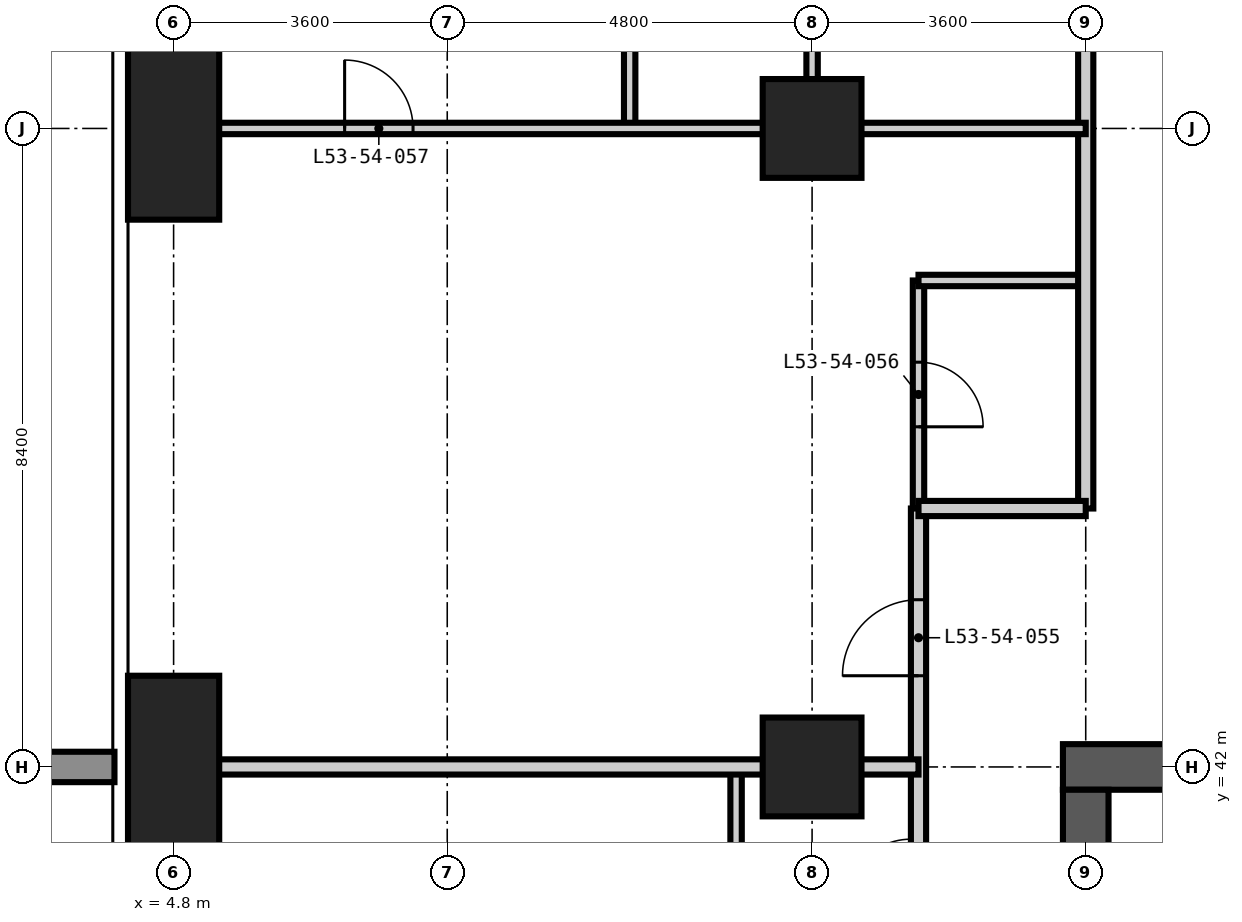
"""IFC4 building model, lengths in metres.
Left out: names, types, materials, properties, quantities, classifications, styles, units other than length and angle.
Written with IfcOpenShell. Run it as: python <this file> out.ifc"""

import sys

from ifc_helpers import new_model, si_unit, direction, frame, frame_2d, origin, origin_2d, place, context, subcontext, project, spatial, rectangle, extrude, element, fill, save


model = new_model("IFC4")
c1 = context("Model", 3, precision=1e-05, world=origin(), true_north=direction((0.0, 1.0)))
c2 = subcontext(c1, "Body", "Model", "MODEL_VIEW")
j1 = project(units=[si_unit("LENGTHUNIT", "METRE"), si_unit("PLANEANGLEUNIT", "RADIAN")], contexts=[c1])
p1 = place(None, origin())
s1 = spatial("IfcSite", under=j1, at=p1, CompositionType="ELEMENT")
p2 = place(p1, origin())
s2 = spatial("IfcBuilding", under=s1, at=p2, CompositionType="ELEMENT")
p3 = place(p2, frame((0.0, 0.0, 205.8)))
s3 = spatial("IfcBuildingStorey", under=s2, at=p3, CompositionType="ELEMENT", Elevation=205.8)
for number, where, z_axis, x_axis in (
    (1, (4.8, 42.0, -0.35), (0.0, 0.0, 1.0), (1.0, 0.0, 0.0)),
    (2, (4.8, 50.4, -0.35), (0.0, 0.0, 1.0), (1.0, 0.0, 0.0)),
):
    element("IfcColumn", number, at=place(p3, frame(where, z_axis=z_axis, x_axis=x_axis)), inside=s3, PredefinedType="COLUMN", context=c2, shape_type="SweptSolid", body=[
        extrude(rectangle(XDim=1.2, YDim=2.4, at=origin_2d()), origin(), (0.0, 0.0, 1.0), 3.6),
    ])
for number, where, z_axis, x_axis in (
    (3, (13.2, 42.0, -0.35), (0.0, 0.0, 1.0), (1.0, 0.0, 0.0)),
    (4, (13.2, 50.4, -0.35), (0.0, 0.0, 1.0), (1.0, 0.0, 0.0)),
):
    element("IfcColumn", number, at=place(p3, frame(where, z_axis=z_axis, x_axis=x_axis)), inside=s3, PredefinedType="COLUMN", context=c2, shape_type="SweptSolid", body=[
        extrude(rectangle(XDim=1.3, YDim=1.3, at=origin_2d()), origin(), (0.0, 0.0, 1.0), 3.6),
    ])
p4 = place(p3, frame((42.3, 42.0, -0.35), z_axis=(0.0, 0.0, 1.0), x_axis=(-1.0, 0.0, 0.0)))
e5 = element("IfcWall", 5, at=p4, inside=s3, PredefinedType="SHEAR", context=c2, shape_type="SweptSolid", body=[
    extrude(rectangle(XDim=25.8, YDim=0.6, at=frame_2d((12.9, 0.0))), origin(), (0.0, 0.0, 1.0), 3.6),
])
p5 = place(p4, frame((20.8, 0.0, 0.35)))
e6 = element("IfcOpeningElement", 6, at=p5, cuts=e5, PredefinedType="OPENING", context=c2, shape_type="SweptSolid", body=[
    extrude(rectangle(XDim=1.0, YDim=2.1, at=frame_2d((0.5, 1.05))), frame((0.0, 0.31, 0.0), z_axis=(0.0, -1.0, 0.0), x_axis=(1.0, 0.0, 0.0)), (0.0, 0.0, 1.0), 0.62),
])
p6 = place(p4, frame((10.2, 0.0, 0.35)))
e7 = element("IfcOpeningElement", 7, at=p6, cuts=e5, PredefinedType="OPENING", context=c2, shape_type="SweptSolid", body=[
    extrude(rectangle(XDim=1.2, YDim=2.2, at=frame_2d((0.6, 1.1))), frame((0.0, 0.31, 0.0), z_axis=(0.0, -1.0, 0.0), x_axis=(1.0, 0.0, 0.0)), (0.0, 0.0, 1.0), 0.62),
])
p7 = place(p3, frame((16.8, 41.7, -0.35), z_axis=(0.0, 0.0, 1.0), x_axis=(0.0, -1.0, 0.0)))
e8 = element("IfcWall", 8, at=p7, inside=s3, PredefinedType="SHEAR", context=c2, shape_type="SweptSolid", body=[
    extrude(rectangle(XDim=24.6, YDim=0.6, at=frame_2d((12.3, 0.0))), origin(), (0.0, 0.0, 1.0), 3.6),
])
p8 = place(p7, frame((11.4, 0.0, 0.35)))
e9 = element("IfcOpeningElement", 9, at=p8, cuts=e8, PredefinedType="OPENING", context=c2, shape_type="SweptSolid", body=[
    extrude(rectangle(XDim=1.8, YDim=2.2, at=frame_2d((0.9, 1.1))), frame((0.0, 0.31, 0.0), z_axis=(0.0, -1.0, 0.0), x_axis=(1.0, 0.0, 0.0)), (0.0, 0.0, 1.0), 0.62),
])
p9 = place(p7, frame((20.2, 0.0, 0.35)))
e10 = element("IfcOpeningElement", 10, at=p9, cuts=e8, PredefinedType="OPENING", context=c2, shape_type="SweptSolid", body=[
    extrude(rectangle(XDim=1.0, YDim=2.1, at=frame_2d((0.5, 1.05))), frame((0.0, 0.31, 0.0), z_axis=(0.0, -1.0, 0.0), x_axis=(1.0, 0.0, 0.0)), (0.0, 0.0, 1.0), 0.62),
])
p10 = place(p7, frame((5.5, 0.0, 0.35)))
e11 = element("IfcOpeningElement", 11, at=p10, cuts=e8, PredefinedType="OPENING", context=c2, shape_type="SweptSolid", body=[
    extrude(rectangle(XDim=1.0, YDim=2.1, at=frame_2d((0.5, 1.05))), frame((0.0, 0.31, 0.0), z_axis=(0.0, -1.0, 0.0), x_axis=(1.0, 0.0, 0.0)), (0.0, 0.0, 1.0), 0.62),
])
p11 = place(p3, frame((12.2, 40.2, 0.0), z_axis=(0.0, 0.0, 1.0), x_axis=(0.0, 1.0, 0.0)))
e12 = element("IfcWall", 12, at=p11, inside=s3, PredefinedType="PARTITIONING", context=c2, shape_type="SweptSolid", body=[
    extrude(rectangle(XDim=1.8, YDim=0.15, at=frame_2d((0.9, 0.0))), origin(), (0.0, 0.0, 1.0), 3.25),
])
p12 = place(p3, frame((14.6, 45.4, 0.0), z_axis=(0.0, 0.0, 1.0), x_axis=(0.0, 1.0, 0.0)))
e13 = element("IfcWall", 13, at=p12, inside=s3, PredefinedType="PARTITIONING", context=c2, shape_type="SweptSolid", body=[
    extrude(rectangle(XDim=3.0, YDim=0.15, at=frame_2d((1.5, 0.0))), origin(), (0.0, 0.0, 1.0), 3.25),
])
p13 = place(p12, frame((1.075, 0.0, 0.0)))
e14 = element("IfcOpeningElement", 14, at=p13, cuts=e13, PredefinedType="OPENING", context=c2, shape_type="SweptSolid", body=[
    extrude(rectangle(XDim=0.85, YDim=2.1, at=frame_2d((0.425, 1.05))), frame((0.0, 0.085, 0.0), z_axis=(0.0, -1.0, 0.0), x_axis=(1.0, 0.0, 0.0)), (0.0, 0.0, 1.0), 0.17),
])
p14 = place(p3, frame((14.6, 48.4, 0.0), z_axis=(0.0, 0.0, 1.0), x_axis=(1.0, 0.0, 0.0)))
e15 = element("IfcWall", 15, at=p14, inside=s3, PredefinedType="PARTITIONING", context=c2, shape_type="SweptSolid", body=[
    extrude(rectangle(XDim=2.2, YDim=0.15, at=frame_2d((1.1, 0.0))), origin(), (0.0, 0.0, 1.0), 3.25),
])
p15 = place(p3, frame((14.6, 29.4, 0.0), z_axis=(0.0, 0.0, 1.0), x_axis=(0.0, 1.0, 0.0)))
e16 = element("IfcWall", 16, at=p15, inside=s3, PredefinedType="PARTITIONING", context=c2, shape_type="SweptSolid", body=[
    extrude(rectangle(XDim=16.0, YDim=0.2, at=frame_2d((8.0, 0.0))), origin(), (0.0, 0.0, 1.0), 3.25),
])
p16 = place(p15, frame((9.1, 0.0, 0.0)))
e17 = element("IfcOpeningElement", 17, at=p16, cuts=e16, PredefinedType="OPENING", context=c2, shape_type="SweptSolid", body=[
    extrude(rectangle(XDim=1.0, YDim=2.2, at=frame_2d((0.5, 1.1))), frame((0.0, 0.11, 0.0), z_axis=(0.0, -1.0, 0.0), x_axis=(1.0, 0.0, 0.0)), (0.0, 0.0, 1.0), 0.22),
])
p17 = place(p15, frame((13.8, 0.0, 0.0)))
e18 = element("IfcOpeningElement", 18, at=p17, cuts=e16, PredefinedType="OPENING", context=c2, shape_type="SweptSolid", body=[
    extrude(rectangle(XDim=1.0, YDim=2.2, at=frame_2d((0.5, 1.1))), frame((0.0, 0.11, 0.0), z_axis=(0.0, -1.0, 0.0), x_axis=(1.0, 0.0, 0.0)), (0.0, 0.0, 1.0), 0.22),
])
p18 = place(p3, frame((16.8, 45.4, 0.0), z_axis=(0.0, 0.0, 1.0), x_axis=(0.0, 1.0, 0.0)))
e19 = element("IfcWall", 19, at=p18, inside=s3, PredefinedType="PARTITIONING", context=c2, shape_type="SweptSolid", body=[
    extrude(rectangle(XDim=9.218, YDim=0.2, at=frame_2d((4.609, 0.0))), origin(), (0.0, 0.0, 1.0), 3.25),
])
p19 = place(p3, frame((14.6, 45.4, 0.0), z_axis=(0.0, 0.0, 1.0), x_axis=(1.0, 0.0, 0.0)))
e20 = element("IfcWall", 20, at=p19, inside=s3, PredefinedType="PARTITIONING", context=c2, shape_type="SweptSolid", body=[
    extrude(rectangle(XDim=2.2, YDim=0.2, at=frame_2d((1.1, 0.0))), origin(), (0.0, 0.0, 1.0), 3.25),
])
p20 = place(p3, frame((4.182, 42.0, 0.0), z_axis=(0.0, 0.0, 1.0), x_axis=(1.0, 0.0, 0.0)))
e21 = element("IfcWall", 21, at=p20, inside=s3, PredefinedType="PARTITIONING", context=c2, shape_type="SweptSolid", body=[
    extrude(rectangle(XDim=10.418, YDim=0.2, at=frame_2d((5.209, 0.0))), origin(), (0.0, 0.0, 1.0), 3.25),
])
p21 = place(p3, frame((10.8, 50.4, 0.0), z_axis=(0.0, 0.0, 1.0), x_axis=(0.0, 1.0, 0.0)))
e22 = element("IfcWall", 22, at=p21, inside=s3, PredefinedType="PARTITIONING", context=c2, shape_type="SweptSolid", body=[
    extrude(rectangle(XDim=3.0, YDim=0.15, at=frame_2d((1.5, 0.0))), origin(), (0.0, 0.0, 1.0), 3.25),
])
p22 = place(p21, frame((1.05, 0.0, 0.0)))
e23 = element("IfcOpeningElement", 23, at=p22, cuts=e22, PredefinedType="OPENING", context=c2, shape_type="SweptSolid", body=[
    extrude(rectangle(XDim=0.9, YDim=2.1, at=frame_2d((0.45, 1.05))), frame((0.0, 0.085, 0.0), z_axis=(0.0, -1.0, 0.0), x_axis=(1.0, 0.0, 0.0)), (0.0, 0.0, 1.0), 0.17),
])
p23 = place(p3, frame((13.2, 50.4, 0.0), z_axis=(0.0, 0.0, 1.0), x_axis=(0.0, 1.0, 0.0)))
e24 = element("IfcWall", 24, at=p23, inside=s3, PredefinedType="PARTITIONING", context=c2, shape_type="SweptSolid", body=[
    extrude(rectangle(XDim=3.0, YDim=0.15, at=frame_2d((1.5, 0.0))), origin(), (0.0, 0.0, 1.0), 3.25),
])
p24 = place(p3, frame((4.182, 50.4, 0.0), z_axis=(0.0, 0.0, 1.0), x_axis=(1.0, 0.0, 0.0)))
e25 = element("IfcWall", 25, at=p24, inside=s3, PredefinedType="PARTITIONING", context=c2, shape_type="SweptSolid", body=[
    extrude(rectangle(XDim=12.618, YDim=0.15, at=frame_2d((6.309, 0.0))), origin(), (0.0, 0.0, 1.0), 3.25),
])
p25 = place(p24, frame((2.868, 0.0, 0.0)))
e26 = element("IfcOpeningElement", 26, at=p25, cuts=e25, PredefinedType="OPENING", context=c2, shape_type="SweptSolid", body=[
    extrude(rectangle(XDim=0.9, YDim=2.1, at=frame_2d((0.45, 1.05))), frame((0.0, 0.085, 0.0), z_axis=(0.0, -1.0, 0.0), x_axis=(1.0, 0.0, 0.0)), (0.0, 0.0, 1.0), 0.17),
])
p26 = place(p17, origin())
e27 = element("IfcDoor", 27, at=p26, inside=s3, OperationType="SINGLE_SWING_LEFT", PredefinedType="DOOR", context=c2, shape_type="SweptSolid", body=[
    extrude(rectangle(XDim=1.0, YDim=2.2, at=frame_2d((0.5, 1.1))), frame((0.0, 0.025, 0.0), z_axis=(0.0, -1.0, 0.0), x_axis=(1.0, 0.0, 0.0)), (0.0, 0.0, 1.0), 0.05),
])
fill(e18, e27)
p27 = place(p13, frame((0.85, 0.0, 0.0), z_axis=(0.0, 0.0, 1.0), x_axis=(-1.0, 0.0, 0.0)))
e28 = element("IfcDoor", 28, at=p27, inside=s3, OperationType="SINGLE_SWING_RIGHT", PredefinedType="DOOR", context=c2, shape_type="SweptSolid", body=[
    extrude(rectangle(XDim=0.85, YDim=2.1, at=frame_2d((0.425, 1.05))), frame((0.0, 0.025, 0.0), z_axis=(0.0, -1.0, 0.0), x_axis=(1.0, 0.0, 0.0)), (0.0, 0.0, 1.0), 0.05),
])
fill(e14, e28)
p28 = place(p25, origin())
e29 = element("IfcDoor", 29, at=p28, inside=s3, OperationType="SINGLE_SWING_LEFT", PredefinedType="DOOR", context=c2, shape_type="SweptSolid", body=[
    extrude(rectangle(XDim=0.9, YDim=2.1, at=frame_2d((0.45, 1.05))), frame((0.0, 0.025, 0.0), z_axis=(0.0, -1.0, 0.0), x_axis=(1.0, 0.0, 0.0)), (0.0, 0.0, 1.0), 0.05),
])
fill(e26, e29)
save(model, sys.argv[1])
